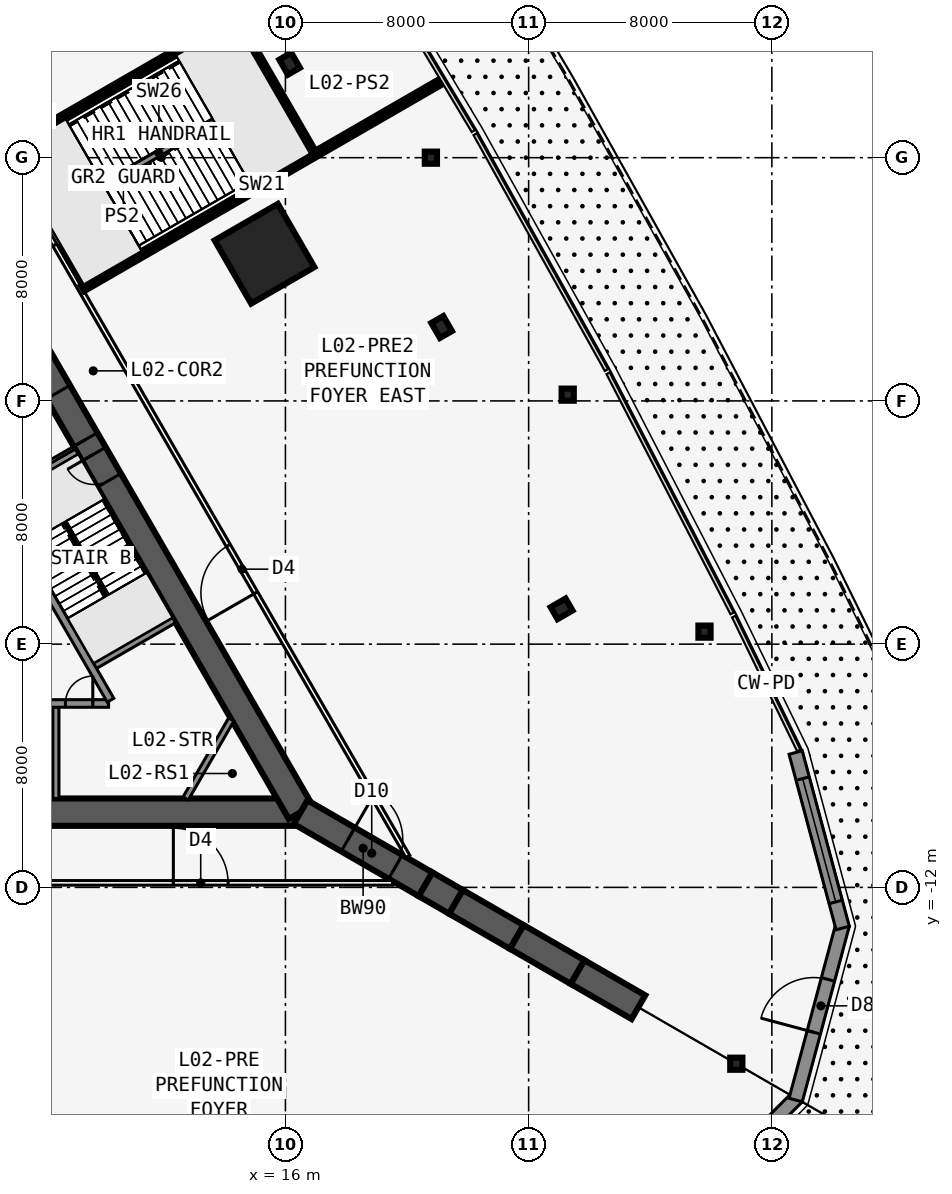
"""IFC4 building model, lengths in metres.
Left out: names, types, materials, properties, quantities, classifications, styles, units other than length and angle.
Written with IfcOpenShell. Run it as: python <this file> out.ifc"""

import sys

from ifc_helpers import new_model, si_unit, direction, frame, frame_2d, origin, origin_2d, place, context, subcontext, project, spatial, rectangle, i_section, extrude, element, fill, save


model = new_model("IFC4")
c1 = context("Model", 3, precision=1e-05, world=origin(), true_north=direction((0.0, 1.0)))
c2 = subcontext(c1, "Body", "Model", "MODEL_VIEW")
j1 = project(units=[si_unit("LENGTHUNIT", "METRE"), si_unit("PLANEANGLEUNIT", "RADIAN")], contexts=[c1])
p1 = place(None, origin())
s1 = spatial("IfcSite", under=j1, at=p1, CompositionType="ELEMENT")
p2 = place(p1, origin())
s2 = spatial("IfcBuilding", under=s1, at=p2, CompositionType="ELEMENT")
p3 = place(p2, frame((0.0, 0.0, 11.0)))
s3 = spatial("IfcBuildingStorey", under=s2, at=p3, CompositionType="ELEMENT", Elevation=11.0)
p4 = place(p3, frame((-16.5, -9.526, 0.0), z_axis=(0.0, 0.0, 1.0), x_axis=(1.0, 0.0, 0.0)))
e1 = element("IfcWall", 1, at=p4, inside=s3, PredefinedType="SHEAR", context=c2, shape_type="SweptSolid", body=[
    extrude(rectangle(XDim=33.0, YDim=0.9, at=frame_2d((16.5, 0.0))), origin(), (0.0, 0.0, 1.0), 6.5),
])
p5 = place(p4, frame((14.05, 0.0, 0.0)))
e2 = element("IfcOpeningElement", 2, at=p5, cuts=e1, PredefinedType="OPENING", context=c2, shape_type="SweptSolid", body=[
    extrude(rectangle(XDim=1.8, YDim=2.13, at=frame_2d((0.9, 1.065))), frame((0.0, 0.46, 0.0), z_axis=(0.0, -1.0, 0.0), x_axis=(1.0, 0.0, 0.0)), (0.0, 0.0, 1.0), 0.92),
])
p6 = place(p3, frame((-0.55, -5.951, 0.0), z_axis=(0.0, 0.0, 1.0), x_axis=(1.0, 0.0, 0.0)))
e3 = element("IfcWall", 3, at=p6, inside=s3, PredefinedType="SOLIDWALL", context=c2, shape_type="SweptSolid", body=[
    extrude(rectangle(XDim=10.733, YDim=0.25, at=frame_2d((5.366, 0.0))), origin(), (0.0, 0.0, 1.0), 6.25),
])
p7 = place(p6, frame((9.314, 0.0, 0.0)))
e4 = element("IfcOpeningElement", 4, at=p7, cuts=e3, PredefinedType="OPENING", context=c2, shape_type="SweptSolid", body=[
    extrude(rectangle(XDim=0.9, YDim=2.13, at=frame_2d((0.45, 1.065))), frame((0.0, 0.135, 0.0), z_axis=(0.0, -1.0, 0.0), x_axis=(1.0, 0.0, 0.0)), (0.0, 0.0, 1.0), 0.27),
])
p8 = place(p6, frame((1.05, 0.0, 0.0)))
e5 = element("IfcOpeningElement", 5, at=p8, cuts=e3, PredefinedType="OPENING", context=c2, shape_type="SweptSolid", body=[
    extrude(rectangle(XDim=1.1, YDim=2.13, at=frame_2d((0.55, 1.065))), frame((0.0, 0.135, 0.0), z_axis=(0.0, -1.0, 0.0), x_axis=(1.0, 0.0, 0.0)), (0.0, 0.0, 1.0), 0.27),
])
p9 = place(p6, frame((4.05, 0.0, 0.0)))
e6 = element("IfcOpeningElement", 6, at=p9, cuts=e3, PredefinedType="OPENING", context=c2, shape_type="SweptSolid", body=[
    extrude(rectangle(XDim=1.1, YDim=2.13, at=frame_2d((0.55, 1.065))), frame((0.0, 0.135, 0.0), z_axis=(0.0, -1.0, 0.0), x_axis=(1.0, 0.0, 0.0)), (0.0, 0.0, 1.0), 0.27),
])
p10 = place(p3, frame((8.45, -5.951, 0.0), z_axis=(0.0, 0.0, 1.0), x_axis=(0.0, -1.0, 0.0)))
e7 = element("IfcWall", 7, at=p10, inside=s3, PredefinedType="SOLIDWALL", context=c2, shape_type="SweptSolid", body=[
    extrude(rectangle(XDim=3.125, YDim=0.2, at=frame_2d((1.562, 0.0))), origin(), (0.0, 0.0, 1.0), 6.25),
])
p11 = place(p3, frame((16.5, -9.526, 0.0), z_axis=(0.0, 0.0, 1.0), x_axis=(-0.499999749417, 0.866025548458, 0.0)))
e8 = element("IfcWall", 8, at=p11, inside=s3, PredefinedType="SHEAR", context=c2, shape_type="SweptSolid", body=[
    extrude(rectangle(XDim=33.0, YDim=0.9, at=frame_2d((16.5, 0.0))), origin(), (0.0, 0.0, 1.0), 6.5),
])
p12 = place(p11, frame((14.15, 0.0, 0.0)))
e9 = element("IfcOpeningElement", 9, at=p12, cuts=e8, PredefinedType="OPENING", context=c2, shape_type="SweptSolid", body=[
    extrude(rectangle(XDim=1.8, YDim=2.13, at=frame_2d((0.9, 1.065))), frame((0.0, 0.46, 0.0), z_axis=(0.0, -1.0, 0.0), x_axis=(1.0, 0.0, 0.0)), (0.0, 0.0, 1.0), 0.92),
])
p13 = place(p11, frame((12.6, 0.0, 0.0)))
e10 = element("IfcOpeningElement", 10, at=p13, cuts=e8, PredefinedType="OPENING", context=c2, shape_type="SweptSolid", body=[
    extrude(rectangle(XDim=1.0, YDim=2.13, at=frame_2d((0.5, 1.065))), frame((0.0, 0.46, 0.0), z_axis=(0.0, -1.0, 0.0), x_axis=(1.0, 0.0, 0.0)), (0.0, 0.0, 1.0), 0.92),
])
p14 = place(p3, frame((10.245, -5.843, 0.0), z_axis=(0.0, 0.0, 1.0), x_axis=(-0.499993009313, 0.866029439822, 0.0)))
e11 = element("IfcWall", 11, at=p14, inside=s3, PredefinedType="SOLIDWALL", context=c2, shape_type="SweptSolid", body=[
    extrude(rectangle(XDim=7.733, YDim=0.25, at=frame_2d((3.866, 0.0))), origin(), (0.0, 0.0, 1.0), 6.25),
])
for number, where, z_axis, x_axis in (
    (12, (9.629, -4.775, 0.0), (0.0, 0.0, 1.0), (0.866, 0.5, 0.0)),
    (13, (6.429, 0.767, 0.0), (0.0, 0.0, 1.0), (0.866, 0.5, 0.0)),
):
    element("IfcWall", number, at=place(p3, frame(where, z_axis=z_axis, x_axis=x_axis)), inside=s3, PredefinedType="SOLIDWALL", context=c2, shape_type="SweptSolid", body=[
        extrude(rectangle(XDim=3.125, YDim=0.2, at=frame_2d((1.562, 0.0))), origin(), (0.0, 0.0, 1.0), 6.25),
    ])
p15 = place(p3, frame((16.5, -9.526, 0.0), z_axis=(0.0, 0.0, 1.0), x_axis=(0.866031398331, -0.499989616998, 0.0)))
e14 = element("IfcWall", 14, at=p15, inside=s3, PredefinedType="SHEAR", context=c2, shape_type="SweptSolid", body=[
    extrude(rectangle(XDim=4.746, YDim=0.9, at=frame_2d((2.373, 0.0))), origin(), (0.0, 0.0, 1.0), 6.5),
])
p16 = place(p15, frame((1.8, 0.0, 0.0)))
e15 = element("IfcOpeningElement", 15, at=p16, cuts=e14, PredefinedType="OPENING", context=c2, shape_type="SweptSolid", body=[
    extrude(rectangle(XDim=1.8, YDim=2.13, at=frame_2d((0.9, 1.065))), frame((0.0, 0.46, 0.0), z_axis=(0.0, -1.0, 0.0), x_axis=(1.0, 0.0, 0.0)), (0.0, 0.0, 1.0), 0.92),
])
p17 = place(p3, frame((20.61, -11.899, 0.0), z_axis=(0.0, 0.0, 1.0), x_axis=(0.866009537788, -0.500027479704, 0.0)))
e16 = element("IfcWall", 16, at=p17, inside=s3, PredefinedType="SHEAR", context=c2, shape_type="SweptSolid", body=[
    extrude(rectangle(XDim=1.155, YDim=0.9, at=frame_2d((0.577, 0.0))), origin(), (0.0, 0.0, 1.0), 6.5),
])
for number, where, z_axis, x_axis in (
    (17, (21.61, -12.477, 0.0), (0.0, 0.0, 1.0), (0.866, -0.5, 0.0)),
    (18, (23.61, -13.631, 0.0), (0.0, 0.0, 1.0), (0.866, -0.5, 0.0)),
    (19, (25.61, -14.786, 0.0), (0.0, 0.0, 1.0), (0.866, -0.5, 0.0)),
):
    element("IfcWall", number, at=place(p3, frame(where, z_axis=z_axis, x_axis=x_axis)), inside=s3, PredefinedType="SHEAR", context=c2, shape_type="SweptSolid", body=[
        extrude(rectangle(XDim=2.309, YDim=0.9, at=frame_2d((1.155, 0.0))), origin(), (0.0, 0.0, 1.0), 6.5),
    ])
for number, where, z_axis, x_axis in (
    (20, (25.083, -2.839, 0.0), (0.0, 0.0, 1.0), (-0.5, 0.866, 0.0)),
    (21, (21.137, 6.43, 0.0), (0.0, 0.0, 1.0), (0.866, 0.5, 0.0)),
    (22, (16.137, 15.09, 0.0), (0.0, 0.0, 1.0), (0.866, 0.5, 0.0)),
):
    element("IfcColumn", number, at=place(p3, frame(where, z_axis=z_axis, x_axis=x_axis)), inside=s3, PredefinedType="COLUMN", context=c2, shape_type="SweptSolid", body=[
        extrude(i_section(OverallWidth=0.455, OverallDepth=0.569, WebThickness=0.078, FlangeThickness=0.125, at=origin_2d()), origin(), (0.0, 0.0, 1.0), 6.5),
    ])
for number, where, z_axis, x_axis in (
    (23, (30.831, -17.8, 0.0), (0.0, 0.0, 1.0), (1.0, 0.0, 0.0)),
    (24, (29.785, -3.588, 0.0), (0.0, 0.0, 1.0), (1.0, 0.0, 0.0)),
    (25, (25.285, 4.206, 0.0), (0.0, 0.0, 1.0), (1.0, 0.0, 0.0)),
    (26, (20.785, 12.0, 0.0), (0.0, 0.0, 1.0), (1.0, 0.0, 0.0)),
):
    element("IfcColumn", number, at=place(p3, frame(where, z_axis=z_axis, x_axis=x_axis)), inside=s3, PredefinedType="COLUMN", context=c2, shape_type="SweptSolid", body=[
        extrude(i_section(OverallWidth=0.401, OverallDepth=0.399, WebThickness=0.025, FlangeThickness=0.04, at=origin_2d()), origin(), (0.0, 0.0, 1.0), 6.5),
    ])
p18 = place(p3, frame((15.312, 8.84, 0.0), z_axis=(0.0, 0.0, 1.0), x_axis=(0.866025403784, 0.5, 0.0)))
e27 = element("IfcColumn", 27, at=p18, inside=s3, PredefinedType="COLUMN", context=c2, shape_type="SweptSolid", body=[
    extrude(rectangle(XDim=2.4, YDim=2.4, at=origin_2d()), origin(), (0.0, 0.0, 1.0), 6.5),
])
p19 = place(p3, frame((28.615, -23.12, 0.0), z_axis=(0.0, 0.0, 1.0), x_axis=(0.707086357855, 0.707127203928, 0.0)))
e28 = element("IfcWall", 28, at=p19, inside=s3, PredefinedType="SOLIDWALL", context=c2, shape_type="SweptSolid", body=[
    extrude(rectangle(XDim=5.977, YDim=0.45, at=frame_2d((2.989, 0.0))), origin(), (0.0, 0.0, 1.0), 6.25),
])
p20 = place(p19, frame((0.67, 0.0, 1.2)))
e29 = element("IfcOpeningElement", 29, at=p20, cuts=e28, PredefinedType="OPENING", context=c2, shape_type="SweptSolid", body=[
    extrude(rectangle(XDim=4.2, YDim=3.6, at=frame_2d((2.1, 1.8))), frame((0.0, 0.235, 0.0), z_axis=(0.0, -1.0, 0.0), x_axis=(1.0, 0.0, 0.0)), (0.0, 0.0, 1.0), 0.47),
])
p21 = place(p3, frame((32.783, -18.994, 0.0), z_axis=(0.0, 0.0, 1.0), x_axis=(0.258801419081, 0.965930548995, 0.0)))
e30 = element("IfcWall", 30, at=p21, inside=s3, PredefinedType="SOLIDWALL", context=c2, shape_type="SweptSolid", body=[
    extrude(rectangle(XDim=5.977, YDim=0.45, at=frame_2d((2.989, 0.0))), origin(), (0.0, 0.0, 1.0), 6.25),
])
p22 = place(p21, frame((2.307, 0.0, 0.0)))
e31 = element("IfcOpeningElement", 31, at=p22, cuts=e30, PredefinedType="OPENING", context=c2, shape_type="SweptSolid", body=[
    extrude(rectangle(XDim=1.8, YDim=2.4, at=frame_2d((0.9, 1.2))), frame((0.0, 0.235, 0.0), z_axis=(0.0, -1.0, 0.0), x_axis=(1.0, 0.0, 0.0)), (0.0, 0.0, 1.0), 0.47),
])
p23 = place(p3, frame((34.33, -13.337, 0.0), z_axis=(0.0, 0.0, 1.0), x_axis=(-0.258791208569, 0.965933284636, 0.0)))
e32 = element("IfcWall", 32, at=p23, inside=s3, PredefinedType="SOLIDWALL", context=c2, shape_type="SweptSolid", body=[
    extrude(rectangle(XDim=5.977, YDim=0.45, at=frame_2d((2.989, 0.0))), origin(), (0.0, 0.0, 1.0), 6.25),
])
p24 = place(p23, frame((0.889, 0.0, 1.2)))
e33 = element("IfcOpeningElement", 33, at=p24, cuts=e32, PredefinedType="OPENING", context=c2, shape_type="SweptSolid", body=[
    extrude(rectangle(XDim=4.2, YDim=3.6, at=frame_2d((2.1, 1.8))), frame((0.0, 0.235, 0.0), z_axis=(0.0, -1.0, 0.0), x_axis=(1.0, 0.0, 0.0)), (0.0, 0.0, 1.0), 0.47),
])
p25 = place(p3, frame((-19.527, -11.851, 0.0), z_axis=(0.0, 0.0, 1.0), x_axis=(1.0, 0.0, 0.0)))
e34 = element("IfcWall", 34, at=p25, inside=s3, PredefinedType="PARTITIONING", context=c2, shape_type="SweptSolid", body=[
    extrude(rectangle(XDim=39.054, YDim=0.15, at=frame_2d((19.527, 0.0))), origin(), (0.0, 0.0, 1.0), 5.308),
])
p26 = place(p25, frame((10.013, 0.0, 0.0)))
e35 = element("IfcOpeningElement", 35, at=p26, cuts=e34, PredefinedType="OPENING", context=c2, shape_type="SweptSolid", body=[
    extrude(rectangle(XDim=1.8, YDim=2.13, at=frame_2d((0.9, 1.065))), frame((0.0, 0.085, 0.0), z_axis=(0.0, -1.0, 0.0), x_axis=(1.0, 0.0, 0.0)), (0.0, 0.0, 1.0), 0.17),
])
p27 = place(p25, frame((23.227, 0.0, 0.0)))
e36 = element("IfcOpeningElement", 36, at=p27, cuts=e34, PredefinedType="OPENING", context=c2, shape_type="SweptSolid", body=[
    extrude(rectangle(XDim=1.8, YDim=2.13, at=frame_2d((0.9, 1.065))), frame((0.0, 0.085, 0.0), z_axis=(0.0, -1.0, 0.0), x_axis=(1.0, 0.0, 0.0)), (0.0, 0.0, 1.0), 0.17),
])
p28 = place(p25, frame((31.841, 0.0, 0.0)))
e37 = element("IfcOpeningElement", 37, at=p28, cuts=e34, PredefinedType="OPENING", context=c2, shape_type="SweptSolid", body=[
    extrude(rectangle(XDim=1.8, YDim=2.13, at=frame_2d((0.9, 1.065))), frame((0.0, 0.085, 0.0), z_axis=(0.0, -1.0, 0.0), x_axis=(1.0, 0.0, 0.0)), (0.0, 0.0, 1.0), 0.17),
])
p29 = place(p3, frame((20.027, -10.985, 0.0), z_axis=(0.0, 0.0, 1.0), x_axis=(-0.500001677587, 0.866024435227, 0.0)))
e38 = element("IfcWall", 38, at=p29, inside=s3, PredefinedType="PARTITIONING", context=c2, shape_type="SweptSolid", body=[
    extrude(rectangle(XDim=39.054, YDim=0.15, at=frame_2d((19.527, 0.0))), origin(), (0.0, 0.0, 1.0), 5.308),
])
p30 = place(p29, frame((10.013, 0.0, 0.0)))
e39 = element("IfcOpeningElement", 39, at=p30, cuts=e38, PredefinedType="OPENING", context=c2, shape_type="SweptSolid", body=[
    extrude(rectangle(XDim=1.8, YDim=2.13, at=frame_2d((0.9, 1.065))), frame((0.0, 0.085, 0.0), z_axis=(0.0, -1.0, 0.0), x_axis=(1.0, 0.0, 0.0)), (0.0, 0.0, 1.0), 0.17),
])
p31 = place(p29, frame((23.227, 0.0, 0.0)))
e40 = element("IfcOpeningElement", 40, at=p31, cuts=e38, PredefinedType="OPENING", context=c2, shape_type="SweptSolid", body=[
    extrude(rectangle(XDim=1.8, YDim=2.13, at=frame_2d((0.9, 1.065))), frame((0.0, 0.085, 0.0), z_axis=(0.0, -1.0, 0.0), x_axis=(1.0, 0.0, 0.0)), (0.0, 0.0, 1.0), 0.17),
])
p32 = place(p29, frame((27.627, 0.0, 0.0)))
e41 = element("IfcOpeningElement", 41, at=p32, cuts=e38, PredefinedType="OPENING", context=c2, shape_type="SweptSolid", body=[
    extrude(rectangle(XDim=1.0, YDim=2.13, at=frame_2d((0.5, 1.065))), frame((0.0, 0.085, 0.0), z_axis=(0.0, -1.0, 0.0), x_axis=(1.0, 0.0, 0.0)), (0.0, 0.0, 1.0), 0.17),
])
p33 = place(p29, frame((30.527, 0.0, 0.0)))
e42 = element("IfcOpeningElement", 42, at=p33, cuts=e38, PredefinedType="OPENING", context=c2, shape_type="SweptSolid", body=[
    extrude(rectangle(XDim=1.0, YDim=2.13, at=frame_2d((0.5, 1.065))), frame((0.0, 0.085, 0.0), z_axis=(0.0, -1.0, 0.0), x_axis=(1.0, 0.0, 0.0)), (0.0, 0.0, 1.0), 0.17),
])
p34 = place(p29, frame((33.277, 0.0, 0.0)))
e43 = element("IfcOpeningElement", 43, at=p34, cuts=e38, PredefinedType="OPENING", context=c2, shape_type="SweptSolid", body=[
    extrude(rectangle(XDim=1.0, YDim=2.13, at=frame_2d((0.5, 1.065))), frame((0.0, 0.085, 0.0), z_axis=(0.0, -1.0, 0.0), x_axis=(1.0, 0.0, 0.0)), (0.0, 0.0, 1.0), 0.17),
])
p35 = place(p29, frame((35.99, 0.0, 0.0)))
e44 = element("IfcOpeningElement", 44, at=p35, cuts=e38, PredefinedType="OPENING", context=c2, shape_type="SweptSolid", body=[
    extrude(rectangle(XDim=1.8, YDim=2.13, at=frame_2d((0.9, 1.065))), frame((0.0, 0.085, 0.0), z_axis=(0.0, -1.0, 0.0), x_axis=(1.0, 0.0, 0.0)), (0.0, 0.0, 1.0), 0.17),
])
p36 = place(p3, frame((9.329, 7.695, 0.0), z_axis=(0.0, 0.0, 1.0), x_axis=(0.866029620801, 0.499992695841, 0.0)))
e45 = element("IfcWall", 45, at=p36, inside=s3, PredefinedType="SHEAR", context=c2, shape_type="SweptSolid", body=[
    extrude(rectangle(XDim=13.607, YDim=0.2, at=frame_2d((6.804, 0.0))), origin(), (0.0, 0.0, 1.0), 6.5),
])
p37 = place(p3, frame((6.729, 12.198, 0.0), z_axis=(0.0, 0.0, 1.0), x_axis=(0.866022969634, 0.500004216049, 0.0)))
e46 = element("IfcWall", 46, at=p37, inside=s3, PredefinedType="SHEAR", context=c2, shape_type="SweptSolid", body=[
    extrude(rectangle(XDim=13.526, YDim=0.2, at=frame_2d((6.763, 0.0))), origin(), (0.0, 0.0, 1.0), 6.5),
])
p38 = place(p3, frame((5.329, 14.623, 0.0), z_axis=(0.0, 0.0, 1.0), x_axis=(0.866024753221, 0.500001126807, 0.0)))
e47 = element("IfcWall", 47, at=p38, inside=s3, PredefinedType="PARTITIONING", context=c2, shape_type="SweptSolid", body=[
    extrude(rectangle(XDim=13.448, YDim=0.15, at=frame_2d((6.724, 0.0))), origin(), (0.0, 0.0, 1.0), 5.308),
])
p39 = place(p3, frame((14.219, -6.476, 0.0), z_axis=(0.0, 0.0, 1.0), x_axis=(-0.499952404951, -0.866052881055, 0.0)))
e48 = element("IfcWall", 48, at=p39, inside=s3, PredefinedType="SOLIDWALL", context=c2, shape_type="SweptSolid", body=[
    extrude(rectangle(XDim=3.002, YDim=0.2, at=frame_2d((1.501, 0.0))), origin(), (0.0, 0.0, 1.0), 6.25),
])
p40 = place(p3, frame((10.135, -2.401, 0.0), z_axis=(0.0, 0.0, 1.0), x_axis=(-0.499992232847, 0.866029888106, 0.0)))
e49 = element("IfcWall", 49, at=p40, inside=s3, PredefinedType="SOLIDWALL", context=c2, shape_type="SweptSolid", body=[
    extrude(rectangle(XDim=2.794, YDim=0.1, at=frame_2d((1.397, 0.0))), origin(), (0.0, 0.0, 1.0), 6.5),
])
p41 = place(p3, frame((16.949, 12.095, 0.0), z_axis=(0.0, 0.0, 1.0), x_axis=(-0.499992051641, 0.866029992723, 0.0)))
e50 = element("IfcWall", 50, at=p41, inside=s3, PredefinedType="SHEAR", context=c2, shape_type="SweptSolid", body=[
    extrude(rectangle(XDim=5.2, YDim=0.2, at=frame_2d((2.6, 0.0))), origin(), (0.0, 0.0, 1.0), 6.5),
])
p42 = place(p3, frame((9.322, 7.807, 0.0), z_axis=(0.0, 0.0, 1.0), x_axis=(-0.500060622324, 0.86599040064, 0.0)))
e51 = element("IfcWall", 51, at=p42, inside=s3, PredefinedType="SOLIDWALL", context=c2, shape_type="SweptSolid", body=[
    extrude(rectangle(XDim=1.5, YDim=0.1, at=frame_2d((0.75, 0.0))), origin(), (0.0, 0.0, 1.0), 6.5),
])
p43 = place(p3, frame((10.023, 11.098, 0.0), z_axis=(0.0, 0.0, 1.0), x_axis=(0.866031452229, 0.49998952364, 0.0)))
e52 = element("IfcWall", 52, at=p43, inside=s3, PredefinedType="SOLIDWALL", context=c2, shape_type="SweptSolid", body=[
    extrude(rectangle(XDim=4.194, YDim=0.2, at=frame_2d((2.097, 0.0))), origin(), (0.0, 0.0, 1.0), 6.5),
])
p44 = place(p22, origin())
e53 = element("IfcDoor", 53, at=p44, inside=s3, OperationType="DOUBLE_DOOR_SINGLE_SWING", PredefinedType="DOOR", context=c2, shape_type="SweptSolid", body=[
    extrude(rectangle(XDim=1.8, YDim=2.4, at=frame_2d((0.9, 1.2))), frame((0.0, 0.025, 0.0), z_axis=(0.0, -1.0, 0.0), x_axis=(1.0, 0.0, 0.0)), (0.0, 0.0, 1.0), 0.05),
])
fill(e31, e53)
p45 = place(p24, origin())
e54 = element("IfcWindow", 54, at=p45, inside=s3, PartitioningType="SINGLE_PANEL", PredefinedType="WINDOW", context=c2, shape_type="SweptSolid", body=[
    extrude(rectangle(XDim=4.2, YDim=3.6, at=frame_2d((2.1, 1.8))), frame((0.0, 0.03, 0.0), z_axis=(0.0, -1.0, 0.0), x_axis=(1.0, 0.0, 0.0)), (0.0, 0.0, 1.0), 0.06),
])
fill(e33, e54)
p46 = place(p28, origin())
e55 = element("IfcDoor", 55, at=p46, inside=s3, OperationType="DOUBLE_DOOR_SINGLE_SWING", PredefinedType="DOOR", context=c2, shape_type="SweptSolid", body=[
    extrude(rectangle(XDim=1.8, YDim=2.13, at=frame_2d((0.9, 1.065))), frame((0.0, 0.025, 0.0), z_axis=(0.0, -1.0, 0.0), x_axis=(1.0, 0.0, 0.0)), (0.0, 0.0, 1.0), 0.05),
])
fill(e37, e55)
p47 = place(p30, origin())
e56 = element("IfcDoor", 56, at=p47, inside=s3, OperationType="DOUBLE_DOOR_SINGLE_SWING", PredefinedType="DOOR", context=c2, shape_type="SweptSolid", body=[
    extrude(rectangle(XDim=1.8, YDim=2.13, at=frame_2d((0.9, 1.065))), frame((0.0, 0.025, 0.0), z_axis=(0.0, -1.0, 0.0), x_axis=(1.0, 0.0, 0.0)), (0.0, 0.0, 1.0), 0.05),
])
fill(e39, e56)
p48 = place(p31, origin())
e57 = element("IfcDoor", 57, at=p48, inside=s3, OperationType="DOUBLE_DOOR_SINGLE_SWING", PredefinedType="DOOR", context=c2, shape_type="SweptSolid", body=[
    extrude(rectangle(XDim=1.8, YDim=2.13, at=frame_2d((0.9, 1.065))), frame((0.0, 0.025, 0.0), z_axis=(0.0, -1.0, 0.0), x_axis=(1.0, 0.0, 0.0)), (0.0, 0.0, 1.0), 0.05),
])
fill(e40, e57)
p49 = place(p12, origin())
e58 = element("IfcDoor", 58, at=p49, inside=s3, OperationType="DOUBLE_DOOR_SINGLE_SWING", PredefinedType="DOOR", context=c2, shape_type="SweptSolid", body=[
    extrude(rectangle(XDim=1.8, YDim=2.13, at=frame_2d((0.9, 1.065))), frame((0.0, 0.025, 0.0), z_axis=(0.0, -1.0, 0.0), x_axis=(1.0, 0.0, 0.0)), (0.0, 0.0, 1.0), 0.05),
])
fill(e9, e58)
p50 = place(p13, origin())
e59 = element("IfcDoor", 59, at=p50, inside=s3, OperationType="SINGLE_SWING_RIGHT", PredefinedType="DOOR", context=c2, shape_type="SweptSolid", body=[
    extrude(rectangle(XDim=1.0, YDim=2.13, at=frame_2d((0.5, 1.065))), frame((0.0, 0.025, 0.0), z_axis=(0.0, -1.0, 0.0), x_axis=(1.0, 0.0, 0.0)), (0.0, 0.0, 1.0), 0.05),
])
fill(e10, e59)
p51 = place(p16, origin())
e60 = element("IfcDoor", 60, at=p51, inside=s3, OperationType="DOUBLE_DOOR_DOUBLE_SWING", PredefinedType="DOOR", context=c2, shape_type="SweptSolid", body=[
    extrude(rectangle(XDim=1.8, YDim=2.13, at=frame_2d((0.9, 1.065))), frame((0.0, 0.025, 0.0), z_axis=(0.0, -1.0, 0.0), x_axis=(1.0, 0.0, 0.0)), (0.0, 0.0, 1.0), 0.05),
])
fill(e15, e60)
p52 = place(p7, origin())
e61 = element("IfcDoor", 61, at=p52, inside=s3, OperationType="SINGLE_SWING_RIGHT", PredefinedType="DOOR", context=c2, shape_type="SweptSolid", body=[
    extrude(rectangle(XDim=0.9, YDim=2.13, at=frame_2d((0.45, 1.065))), frame((0.0, 0.025, 0.0), z_axis=(0.0, -1.0, 0.0), x_axis=(1.0, 0.0, 0.0)), (0.0, 0.0, 1.0), 0.05),
])
fill(e4, e61)
save(model, sys.argv[1])
